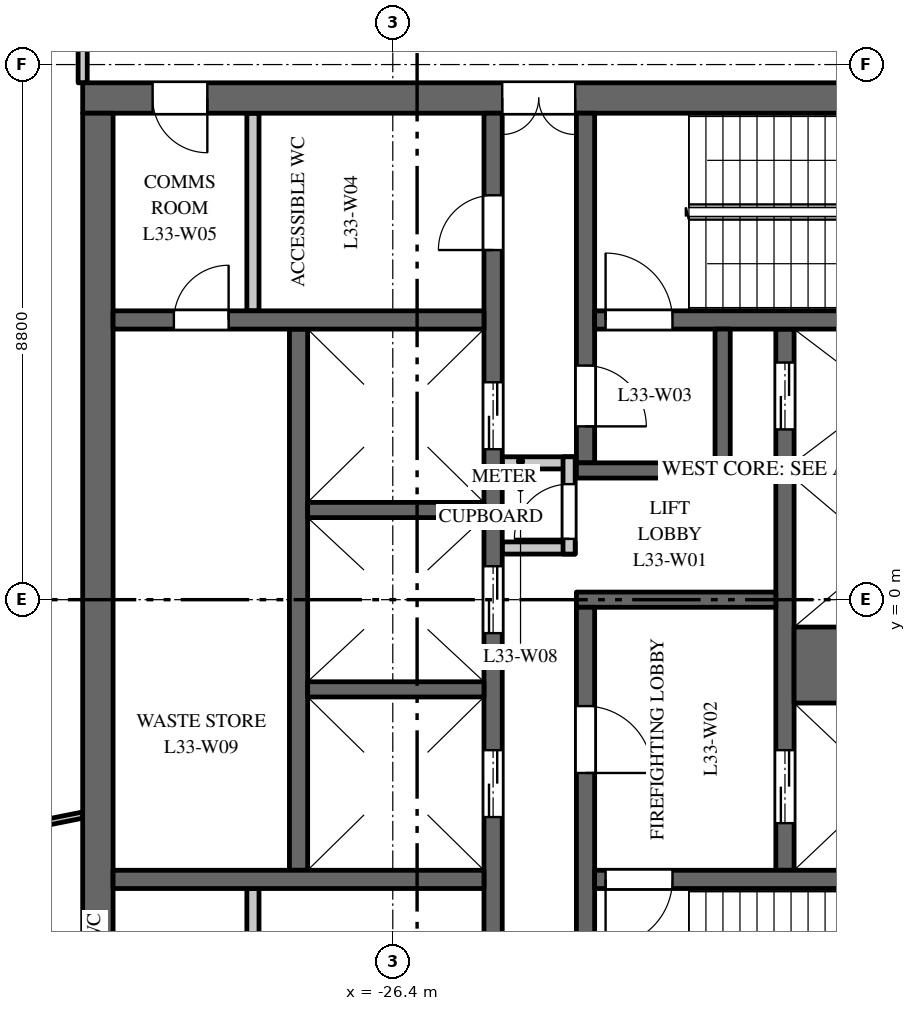
"""IFC4 building model, lengths in metres.
Left out: names, types, materials, properties, quantities, classifications, styles, units other than length and angle.
Written with IfcOpenShell. Run it as: python <this file> out.ifc"""

import sys

from ifc_helpers import new_model, si_unit, direction, frame, frame_2d, origin, place, context, subcontext, project, spatial, rectangle, extrude, element, fill, save


model = new_model("IFC4")
c1 = context("Model", 3, precision=1e-05, world=origin(), true_north=direction((0.0, 1.0)))
c2 = subcontext(c1, "Body", "Model", "MODEL_VIEW")
j1 = project(units=[si_unit("LENGTHUNIT", "METRE"), si_unit("PLANEANGLEUNIT", "RADIAN")], contexts=[c1])
p1 = place(None, origin())
s1 = spatial("IfcSite", under=j1, at=p1, CompositionType="ELEMENT")
p2 = place(p1, origin())
s2 = spatial("IfcBuilding", under=s1, at=p2, CompositionType="ELEMENT")
p3 = place(p2, frame((0.0, 0.0, 146.0)))
s3 = spatial("IfcBuildingStorey", under=s2, at=p3, CompositionType="ELEMENT", Elevation=146.0)
p4 = place(p3, frame((-16.5, 8.25, 0.0), z_axis=(0.0, 0.0, 1.0), x_axis=(-1.0, 0.0, 0.0)))
e1 = element("IfcWall", 1, at=p4, inside=s3, PredefinedType="SHEAR", context=c2, shape_type="SweptSolid", body=[
    extrude(rectangle(XDim=15.0, YDim=0.5, at=frame_2d((7.5, 0.0))), origin(), (0.0, 0.0, 1.0), 3.7),
])
p5 = place(p4, frame((6.9, 0.0, 0.0)))
e2 = element("IfcOpeningElement", 2, at=p5, cuts=e1, PredefinedType="OPENING", context=c2, shape_type="SweptSolid", body=[
    extrude(rectangle(XDim=1.2, YDim=2.1, at=frame_2d((0.6, 1.05))), frame((0.0, 0.26, 0.0), z_axis=(0.0, -1.0, 0.0), x_axis=(1.0, 0.0, 0.0)), (0.0, 0.0, 1.0), 0.52),
])
p6 = place(p4, frame((12.95, 0.0, 0.0)))
e3 = element("IfcOpeningElement", 3, at=p6, cuts=e1, PredefinedType="OPENING", context=c2, shape_type="SweptSolid", body=[
    extrude(rectangle(XDim=0.9, YDim=2.1, at=frame_2d((0.45, 1.05))), frame((0.0, 0.26, 0.0), z_axis=(0.0, -1.0, 0.0), x_axis=(1.0, 0.0, 0.0)), (0.0, 0.0, 1.0), 0.52),
])
p7 = place(p3, frame((-27.95, -4.45, 0.0), z_axis=(0.0, 0.0, 1.0), x_axis=(0.0, 1.0, 0.0)))
e4 = element("IfcWall", 4, at=p7, inside=s3, PredefinedType="SHEAR", context=c2, shape_type="SweptSolid", body=[
    extrude(rectangle(XDim=8.9, YDim=0.3, at=frame_2d((4.45, 0.0))), origin(), (0.0, 0.0, 1.0), 3.7),
])
p8 = place(p3, frame((-19.95, -4.45, 0.0), z_axis=(0.0, 0.0, 1.0), x_axis=(0.0, 1.0, 0.0)))
e5 = element("IfcWall", 5, at=p8, inside=s3, PredefinedType="SHEAR", context=c2, shape_type="SweptSolid", body=[
    extrude(rectangle(XDim=8.9, YDim=0.3, at=frame_2d((4.45, 0.0))), origin(), (0.0, 0.0, 1.0), 3.7),
])
p9 = place(p8, frame((0.775, 0.0, 0.0)))
e6 = element("IfcOpeningElement", 6, at=p9, cuts=e5, PredefinedType="OPENING", context=c2, shape_type="SweptSolid", body=[
    extrude(rectangle(XDim=1.2, YDim=2.1, at=frame_2d((0.6, 1.05))), frame((0.0, 0.16, 0.0), z_axis=(0.0, -1.0, 0.0), x_axis=(1.0, 0.0, 0.0)), (0.0, 0.0, 1.0), 0.32),
])
p10 = place(p8, frame((7.25, 0.0, 0.0)))
e7 = element("IfcOpeningElement", 7, at=p10, cuts=e5, PredefinedType="OPENING", context=c2, shape_type="SweptSolid", body=[
    extrude(rectangle(XDim=1.1, YDim=2.1, at=frame_2d((0.55, 1.05))), frame((0.0, 0.16, 0.0), z_axis=(0.0, -1.0, 0.0), x_axis=(1.0, 0.0, 0.0)), (0.0, 0.0, 1.0), 0.32),
])
p11 = place(p3, frame((-24.75, -8.0, 0.0), z_axis=(0.0, 0.0, 1.0), x_axis=(0.0, 1.0, 0.0)))
e8 = element("IfcWall", 8, at=p11, inside=s3, PredefinedType="SHEAR", context=c2, shape_type="SweptSolid", body=[
    extrude(rectangle(XDim=16.0, YDim=0.3, at=frame_2d((8.0, 0.0))), origin(), (0.0, 0.0, 1.0), 3.7),
])
p12 = place(p11, frame((4.425, 0.0, 0.0)))
e9 = element("IfcOpeningElement", 9, at=p12, cuts=e8, PredefinedType="OPENING", context=c2, shape_type="SweptSolid", body=[
    extrude(rectangle(XDim=1.1, YDim=2.1, at=frame_2d((0.55, 1.05))), frame((0.0, 0.16, 0.0), z_axis=(0.0, -1.0, 0.0), x_axis=(1.0, 0.0, 0.0)), (0.0, 0.0, 1.0), 0.32),
])
p13 = place(p11, frame((7.45, 0.0, 0.0)))
e10 = element("IfcOpeningElement", 10, at=p13, cuts=e8, PredefinedType="OPENING", context=c2, shape_type="SweptSolid", body=[
    extrude(rectangle(XDim=1.1, YDim=2.1, at=frame_2d((0.55, 1.05))), frame((0.0, 0.16, 0.0), z_axis=(0.0, -1.0, 0.0), x_axis=(1.0, 0.0, 0.0)), (0.0, 0.0, 1.0), 0.32),
])
p14 = place(p11, frame((10.475, 0.0, 0.0)))
e11 = element("IfcOpeningElement", 11, at=p14, cuts=e8, PredefinedType="OPENING", context=c2, shape_type="SweptSolid", body=[
    extrude(rectangle(XDim=1.1, YDim=2.1, at=frame_2d((0.55, 1.05))), frame((0.0, 0.16, 0.0), z_axis=(0.0, -1.0, 0.0), x_axis=(1.0, 0.0, 0.0)), (0.0, 0.0, 1.0), 0.32),
])
p15 = place(p11, frame((13.75, 0.0, 0.0)))
e12 = element("IfcOpeningElement", 12, at=p15, cuts=e8, PredefinedType="OPENING", context=c2, shape_type="SweptSolid", body=[
    extrude(rectangle(XDim=0.9, YDim=2.1, at=frame_2d((0.45, 1.05))), frame((0.0, 0.16, 0.0), z_axis=(0.0, -1.0, 0.0), x_axis=(1.0, 0.0, 0.0)), (0.0, 0.0, 1.0), 0.32),
])
p16 = place(p11, frame((1.35, 0.0, 0.0)))
e13 = element("IfcOpeningElement", 13, at=p16, cuts=e8, PredefinedType="OPENING", context=c2, shape_type="SweptSolid", body=[
    extrude(rectangle(XDim=0.9, YDim=2.1, at=frame_2d((0.45, 1.05))), frame((0.0, 0.16, 0.0), z_axis=(0.0, -1.0, 0.0), x_axis=(1.0, 0.0, 0.0)), (0.0, 0.0, 1.0), 0.32),
])
p17 = place(p3, frame((-20.1, 0.0, 0.0), z_axis=(0.0, 0.0, 1.0), x_axis=(-1.0, 0.0, 0.0)))
e14 = element("IfcWall", 14, at=p17, inside=s3, PredefinedType="SHEAR", context=c2, shape_type="SweptSolid", body=[
    extrude(rectangle(XDim=3.28, YDim=0.25, at=frame_2d((1.64, 0.0))), origin(), (0.0, 0.0, 1.0), 3.7),
])
for number, where, z_axis, x_axis in (
    (15, (-23.4, 0.85, 0.0), (0.0, 0.0, 1.0), (-1.0, 0.0, 0.0)),
    (16, (-23.4, 2.25, 0.0), (0.0, 0.0, 1.0), (-1.0, 0.0, 0.0)),
):
    element("IfcWall", number, at=place(p3, frame(where, z_axis=z_axis, x_axis=x_axis)), inside=s3, PredefinedType="PARTITIONING", context=c2, shape_type="SweptSolid", body=[
        extrude(rectangle(XDim=1.2, YDim=0.2, at=frame_2d((0.6, 0.0))), origin(), (0.0, 0.0, 1.0), 3.7),
    ])
p18 = place(p3, frame((-23.5, 0.75, 0.0), z_axis=(0.0, 0.0, 1.0), x_axis=(0.0, 1.0, 0.0)))
e17 = element("IfcWall", 17, at=p18, inside=s3, PredefinedType="PARTITIONING", context=c2, shape_type="SweptSolid", body=[
    extrude(rectangle(XDim=1.6, YDim=0.2, at=frame_2d((0.8, 0.0))), origin(), (0.0, 0.0, 1.0), 3.7),
])
p19 = place(p18, frame((0.25, 0.0, 0.0)))
e18 = element("IfcOpeningElement", 18, at=p19, cuts=e17, PredefinedType="OPENING", context=c2, shape_type="SweptSolid", body=[
    extrude(rectangle(XDim=0.9, YDim=2.1, at=frame_2d((0.45, 1.05))), frame((0.0, 0.11, 0.0), z_axis=(0.0, -1.0, 0.0), x_axis=(1.0, 0.0, 0.0)), (0.0, 0.0, 1.0), 0.22),
])
p20 = place(p3, frame((-31.25, -8.0, 0.0), z_axis=(0.0, 0.0, 1.0), x_axis=(0.0, 1.0, 0.0)))
e19 = element("IfcWall", 19, at=p20, inside=s3, PredefinedType="SHEAR", context=c2, shape_type="SweptSolid", body=[
    extrude(rectangle(XDim=16.0, YDim=0.5, at=frame_2d((8.0, 0.0))), origin(), (0.0, 0.0, 1.0), 3.7),
])
p21 = place(p3, frame((-24.9, 4.6, 0.0), z_axis=(0.0, 0.0, 1.0), x_axis=(-1.0, 0.0, 0.0)))
e20 = element("IfcWall", 20, at=p21, inside=s3, PredefinedType="SHEAR", context=c2, shape_type="SweptSolid", body=[
    extrude(rectangle(XDim=6.1, YDim=0.3, at=frame_2d((3.05, 0.0))), origin(), (0.0, 0.0, 1.0), 3.7),
])
p22 = place(p21, frame((4.2, 0.0, 0.0)))
e21 = element("IfcOpeningElement", 21, at=p22, cuts=e20, PredefinedType="OPENING", context=c2, shape_type="SweptSolid", body=[
    extrude(rectangle(XDim=0.9, YDim=2.1, at=frame_2d((0.45, 1.05))), frame((0.0, 0.16, 0.0), z_axis=(0.0, -1.0, 0.0), x_axis=(1.0, 0.0, 0.0)), (0.0, 0.0, 1.0), 0.32),
])
for number, where, z_axis, x_axis in (
    (22, (-28.7, 4.75, 0.0), (0.0, 0.0, 1.0), (0.0, 1.0, 0.0)),
    (23, (-28.7, -8.0, 0.0), (0.0, 0.0, 1.0), (0.0, 1.0, 0.0)),
):
    element("IfcWall", number, at=place(p3, frame(where, z_axis=z_axis, x_axis=x_axis)), inside=s3, PredefinedType="PARTITIONING", context=c2, shape_type="SweptSolid", body=[
        extrude(rectangle(XDim=3.25, YDim=0.2, at=frame_2d((1.625, 0.0))), origin(), (0.0, 0.0, 1.0), 3.7),
    ])
p23 = place(p3, frame((-24.9, -4.6, 0.0), z_axis=(0.0, 0.0, 1.0), x_axis=(-1.0, 0.0, 0.0)))
e24 = element("IfcWall", 24, at=p23, inside=s3, PredefinedType="SHEAR", context=c2, shape_type="SweptSolid", body=[
    extrude(rectangle(XDim=6.1, YDim=0.3, at=frame_2d((3.05, 0.0))), origin(), (0.0, 0.0, 1.0), 3.7),
])
p24 = place(p3, frame((-16.9, -1.075, 0.0), z_axis=(0.0, 0.0, 1.0), x_axis=(-1.0, 0.0, 0.0)))
e25 = element("IfcWall", 25, at=p24, inside=s3, PredefinedType="SHEAR", context=c2, shape_type="SweptSolid", body=[
    extrude(rectangle(XDim=2.9, YDim=1.25, at=frame_2d((1.45, 0.0))), origin(), (0.0, 0.0, 1.0), 3.7),
])
for number, where, z_axis, x_axis in (
    (26, (-16.9, 2.125, 0.0), (0.0, 0.0, 1.0), (-1.0, 0.0, 0.0)),
    (27, (-24.9, -1.475, 0.0), (0.0, 0.0, 1.0), (-1.0, 0.0, 0.0)),
    (28, (-24.9, 1.475, 0.0), (0.0, 0.0, 1.0), (-1.0, 0.0, 0.0)),
):
    element("IfcWall", number, at=place(p3, frame(where, z_axis=z_axis, x_axis=x_axis)), inside=s3, PredefinedType="SHEAR", context=c2, shape_type="SweptSolid", body=[
        extrude(rectangle(XDim=2.9, YDim=0.25, at=frame_2d((1.45, 0.0))), origin(), (0.0, 0.0, 1.0), 3.7),
    ])
p25 = place(p3, frame((-23.23, 2.25, 0.0), z_axis=(0.0, 0.0, 1.0), x_axis=(0.0, 1.0, 0.0)))
e29 = element("IfcWall", 29, at=p25, inside=s3, PredefinedType="SHEAR", context=c2, shape_type="SweptSolid", body=[
    extrude(rectangle(XDim=5.75, YDim=0.3, at=frame_2d((2.875, 0.0))), origin(), (0.0, 0.0, 1.0), 3.7),
])
p26 = place(p25, frame((0.6, 0.0, 0.0)))
e30 = element("IfcOpeningElement", 30, at=p26, cuts=e29, PredefinedType="OPENING", context=c2, shape_type="SweptSolid", body=[
    extrude(rectangle(XDim=1.0, YDim=2.1, at=frame_2d((0.5, 1.05))), frame((0.0, 0.16, 0.0), z_axis=(0.0, -1.0, 0.0), x_axis=(1.0, 0.0, 0.0)), (0.0, 0.0, 1.0), 0.32),
])
p27 = place(p3, frame((-23.23, -8.0, 0.0), z_axis=(0.0, 0.0, 1.0), x_axis=(0.0, 1.0, 0.0)))
e31 = element("IfcWall", 31, at=p27, inside=s3, PredefinedType="SHEAR", context=c2, shape_type="SweptSolid", body=[
    extrude(rectangle(XDim=7.875, YDim=0.3, at=frame_2d((3.938, 0.0))), origin(), (0.0, 0.0, 1.0), 3.7),
])
p28 = place(p27, frame((5.15, 0.0, 0.0)))
e32 = element("IfcOpeningElement", 32, at=p28, cuts=e31, PredefinedType="OPENING", context=c2, shape_type="SweptSolid", body=[
    extrude(rectangle(XDim=1.1, YDim=2.1, at=frame_2d((0.55, 1.05))), frame((0.0, 0.16, 0.0), z_axis=(0.0, -1.0, 0.0), x_axis=(1.0, 0.0, 0.0)), (0.0, 0.0, 1.0), 0.32),
])
p29 = place(p3, frame((-16.9, 4.6, 0.0), z_axis=(0.0, 0.0, 1.0), x_axis=(-1.0, 0.0, 0.0)))
e33 = element("IfcWall", 33, at=p29, inside=s3, PredefinedType="SHEAR", context=c2, shape_type="SweptSolid", body=[
    extrude(rectangle(XDim=6.18, YDim=0.3, at=frame_2d((3.09, 0.0))), origin(), (0.0, 0.0, 1.0), 3.7),
])
p30 = place(p29, frame((4.9, 0.0, 0.0)))
e34 = element("IfcOpeningElement", 34, at=p30, cuts=e33, PredefinedType="OPENING", context=c2, shape_type="SweptSolid", body=[
    extrude(rectangle(XDim=1.1, YDim=2.1, at=frame_2d((0.55, 1.05))), frame((0.0, 0.16, 0.0), z_axis=(0.0, -1.0, 0.0), x_axis=(1.0, 0.0, 0.0)), (0.0, 0.0, 1.0), 0.32),
])
p31 = place(p3, frame((-16.9, -4.6, 0.0), z_axis=(0.0, 0.0, 1.0), x_axis=(-1.0, 0.0, 0.0)))
e35 = element("IfcWall", 35, at=p31, inside=s3, PredefinedType="SHEAR", context=c2, shape_type="SweptSolid", body=[
    extrude(rectangle(XDim=6.18, YDim=0.3, at=frame_2d((3.09, 0.0))), origin(), (0.0, 0.0, 1.0), 3.7),
])
p32 = place(p31, frame((4.9, 0.0, 0.0)))
e36 = element("IfcOpeningElement", 36, at=p32, cuts=e35, PredefinedType="OPENING", context=c2, shape_type="SweptSolid", body=[
    extrude(rectangle(XDim=1.1, YDim=2.1, at=frame_2d((0.55, 1.05))), frame((0.0, 0.16, 0.0), z_axis=(0.0, -1.0, 0.0), x_axis=(1.0, 0.0, 0.0)), (0.0, 0.0, 1.0), 0.32),
])
p33 = place(p3, frame((-20.85, 2.125, 0.0), z_axis=(0.0, 0.0, 1.0), x_axis=(-1.0, 0.0, 0.0)))
e37 = element("IfcWall", 37, at=p33, inside=s3, PredefinedType="SHEAR", context=c2, shape_type="SweptSolid", body=[
    extrude(rectangle(XDim=2.53, YDim=0.25, at=frame_2d((1.265, 0.0))), origin(), (0.0, 0.0, 1.0), 3.7),
])
p34 = place(p3, frame((-20.975, 2.25, 0.0), z_axis=(0.0, 0.0, 1.0), x_axis=(0.0, 1.0, 0.0)))
e38 = element("IfcWall", 38, at=p34, inside=s3, PredefinedType="SHEAR", context=c2, shape_type="SweptSolid", body=[
    extrude(rectangle(XDim=2.2, YDim=0.25, at=frame_2d((1.1, 0.0))), origin(), (0.0, 0.0, 1.0), 3.7),
])
p35 = place(p3, frame((-35.512, -4.349, 0.0), z_axis=(0.0, 0.0, 1.0), x_axis=(0.980357474535, 0.197228857227, 0.0)))
e39 = element("IfcWall", 39, at=p35, inside=s3, PredefinedType="PARTITIONING", context=c2, shape_type="SweptSolid", body=[
    extrude(rectangle(XDim=4.092, YDim=0.1, at=frame_2d((2.046, 0.0))), origin(), (0.0, 0.0, 1.0), 3.2),
])
p36 = place(p3, frame((-31.5, 8.5, 0.0), z_axis=(0.0, 0.0, 1.0), x_axis=(0.0, 1.0, 0.0)))
e40 = element("IfcWall", 40, at=p36, inside=s3, PredefinedType="PARTITIONING", context=c2, shape_type="SweptSolid", body=[
    extrude(rectangle(XDim=2.2, YDim=0.15, at=frame_2d((1.1, 0.0))), origin(), (0.0, 0.0, 1.0), 3.7),
])
p37 = place(p36, frame((0.55, 0.0, 0.0)))
e41 = element("IfcOpeningElement", 41, at=p37, cuts=e40, PredefinedType="OPENING", context=c2, shape_type="SweptSolid", body=[
    extrude(rectangle(XDim=1.0, YDim=2.1, at=frame_2d((0.5, 1.05))), frame((0.0, 0.085, 0.0), z_axis=(0.0, -1.0, 0.0), x_axis=(1.0, 0.0, 0.0)), (0.0, 0.0, 1.0), 0.17),
])
p38 = place(p3, frame((-20.796, 13.996, 0.0), z_axis=(0.0, 0.0, 1.0), x_axis=(0.925477336125, -0.378802983514, 0.0)))
e42 = element("IfcWall", 42, at=p38, inside=s3, PredefinedType="PARTITIONING", context=c2, shape_type="SweptSolid", body=[
    extrude(rectangle(XDim=14.974, YDim=0.1, at=frame_2d((7.487, 0.0))), origin(), (0.0, 0.0, 1.0), 2.75),
])
p39 = place(p9, origin())
e43 = element("IfcDoor", 43, at=p39, inside=s3, OperationType="DOUBLE_DOOR_SLIDING", PredefinedType="DOOR", context=c2, shape_type="SweptSolid", body=[
    extrude(rectangle(XDim=1.2, YDim=2.1, at=frame_2d((0.6, 1.05))), frame((0.0, 0.025, 0.0), z_axis=(0.0, -1.0, 0.0), x_axis=(1.0, 0.0, 0.0)), (0.0, 0.0, 1.0), 0.05),
])
fill(e6, e43)
p40 = place(p10, origin())
e44 = element("IfcDoor", 44, at=p40, inside=s3, OperationType="DOUBLE_DOOR_SLIDING", PredefinedType="DOOR", context=c2, shape_type="SweptSolid", body=[
    extrude(rectangle(XDim=1.1, YDim=2.1, at=frame_2d((0.55, 1.05))), frame((0.0, 0.025, 0.0), z_axis=(0.0, -1.0, 0.0), x_axis=(1.0, 0.0, 0.0)), (0.0, 0.0, 1.0), 0.05),
])
fill(e7, e44)
p41 = place(p12, origin())
e45 = element("IfcDoor", 45, at=p41, inside=s3, OperationType="DOUBLE_DOOR_SLIDING", PredefinedType="DOOR", context=c2, shape_type="SweptSolid", body=[
    extrude(rectangle(XDim=1.1, YDim=2.1, at=frame_2d((0.55, 1.05))), frame((0.0, 0.025, 0.0), z_axis=(0.0, -1.0, 0.0), x_axis=(1.0, 0.0, 0.0)), (0.0, 0.0, 1.0), 0.05),
])
fill(e9, e45)
p42 = place(p13, origin())
e46 = element("IfcDoor", 46, at=p42, inside=s3, OperationType="DOUBLE_DOOR_SLIDING", PredefinedType="DOOR", context=c2, shape_type="SweptSolid", body=[
    extrude(rectangle(XDim=1.1, YDim=2.1, at=frame_2d((0.55, 1.05))), frame((0.0, 0.025, 0.0), z_axis=(0.0, -1.0, 0.0), x_axis=(1.0, 0.0, 0.0)), (0.0, 0.0, 1.0), 0.05),
])
fill(e10, e46)
p43 = place(p14, origin())
e47 = element("IfcDoor", 47, at=p43, inside=s3, OperationType="DOUBLE_DOOR_SLIDING", PredefinedType="DOOR", context=c2, shape_type="SweptSolid", body=[
    extrude(rectangle(XDim=1.1, YDim=2.1, at=frame_2d((0.55, 1.05))), frame((0.0, 0.025, 0.0), z_axis=(0.0, -1.0, 0.0), x_axis=(1.0, 0.0, 0.0)), (0.0, 0.0, 1.0), 0.05),
])
fill(e11, e47)
p44 = place(p30, origin())
e48 = element("IfcDoor", 48, at=p44, inside=s3, OperationType="SINGLE_SWING_RIGHT", PredefinedType="DOOR", context=c2, shape_type="SweptSolid", body=[
    extrude(rectangle(XDim=1.1, YDim=2.1, at=frame_2d((0.55, 1.05))), frame((0.0, 0.025, 0.0), z_axis=(0.0, -1.0, 0.0), x_axis=(1.0, 0.0, 0.0)), (0.0, 0.0, 1.0), 0.05),
])
fill(e34, e48)
p45 = place(p32, origin())
e49 = element("IfcDoor", 49, at=p45, inside=s3, OperationType="SINGLE_SWING_LEFT", PredefinedType="DOOR", context=c2, shape_type="SweptSolid", body=[
    extrude(rectangle(XDim=1.1, YDim=2.1, at=frame_2d((0.55, 1.05))), frame((0.0, 0.025, 0.0), z_axis=(0.0, -1.0, 0.0), x_axis=(1.0, 0.0, 0.0)), (0.0, 0.0, 1.0), 0.05),
])
fill(e36, e49)
p46 = place(p28, origin())
e50 = element("IfcDoor", 50, at=p46, inside=s3, OperationType="SINGLE_SWING_LEFT", PredefinedType="DOOR", context=c2, shape_type="SweptSolid", body=[
    extrude(rectangle(XDim=1.1, YDim=2.1, at=frame_2d((0.55, 1.05))), frame((0.0, 0.025, 0.0), z_axis=(0.0, -1.0, 0.0), x_axis=(1.0, 0.0, 0.0)), (0.0, 0.0, 1.0), 0.05),
])
fill(e32, e50)
p47 = place(p26, origin())
e51 = element("IfcDoor", 51, at=p47, inside=s3, OperationType="SINGLE_SWING_LEFT", PredefinedType="DOOR", context=c2, shape_type="SweptSolid", body=[
    extrude(rectangle(XDim=1.0, YDim=2.1, at=frame_2d((0.5, 1.05))), frame((0.0, 0.025, 0.0), z_axis=(0.0, -1.0, 0.0), x_axis=(1.0, 0.0, 0.0)), (0.0, 0.0, 1.0), 0.05),
])
fill(e30, e51)
p48 = place(p5, origin())
e52 = element("IfcDoor", 52, at=p48, inside=s3, OperationType="DOUBLE_DOOR_DOUBLE_SWING", PredefinedType="DOOR", context=c2, shape_type="SweptSolid", body=[
    extrude(rectangle(XDim=1.2, YDim=2.1, at=frame_2d((0.6, 1.05))), frame((0.0, 0.025, 0.0), z_axis=(0.0, -1.0, 0.0), x_axis=(1.0, 0.0, 0.0)), (0.0, 0.0, 1.0), 0.05),
])
fill(e2, e52)
p49 = place(p15, origin())
e53 = element("IfcDoor", 53, at=p49, inside=s3, OperationType="SINGLE_SWING_RIGHT", PredefinedType="DOOR", context=c2, shape_type="SweptSolid", body=[
    extrude(rectangle(XDim=0.9, YDim=2.1, at=frame_2d((0.45, 1.05))), frame((0.0, 0.025, 0.0), z_axis=(0.0, -1.0, 0.0), x_axis=(1.0, 0.0, 0.0)), (0.0, 0.0, 1.0), 0.05),
])
fill(e12, e53)
p50 = place(p6, origin())
e54 = element("IfcDoor", 54, at=p50, inside=s3, OperationType="SINGLE_SWING_RIGHT", PredefinedType="DOOR", context=c2, shape_type="SweptSolid", body=[
    extrude(rectangle(XDim=0.9, YDim=2.1, at=frame_2d((0.45, 1.05))), frame((0.0, 0.025, 0.0), z_axis=(0.0, -1.0, 0.0), x_axis=(1.0, 0.0, 0.0)), (0.0, 0.0, 1.0), 0.05),
])
fill(e3, e54)
p51 = place(p19, origin())
e55 = element("IfcDoor", 55, at=p51, inside=s3, OperationType="SINGLE_SWING_RIGHT", PredefinedType="DOOR", context=c2, shape_type="SweptSolid", body=[
    extrude(rectangle(XDim=0.9, YDim=2.1, at=frame_2d((0.45, 1.05))), frame((0.0, 0.025, 0.0), z_axis=(0.0, -1.0, 0.0), x_axis=(1.0, 0.0, 0.0)), (0.0, 0.0, 1.0), 0.05),
])
fill(e18, e55)
p52 = place(p22, origin())
e56 = element("IfcDoor", 56, at=p52, inside=s3, OperationType="SINGLE_SWING_LEFT", PredefinedType="DOOR", context=c2, shape_type="SweptSolid", body=[
    extrude(rectangle(XDim=0.9, YDim=2.1, at=frame_2d((0.45, 1.05))), frame((0.0, 0.025, 0.0), z_axis=(0.0, -1.0, 0.0), x_axis=(1.0, 0.0, 0.0)), (0.0, 0.0, 1.0), 0.05),
])
fill(e21, e56)
save(model, sys.argv[1])
